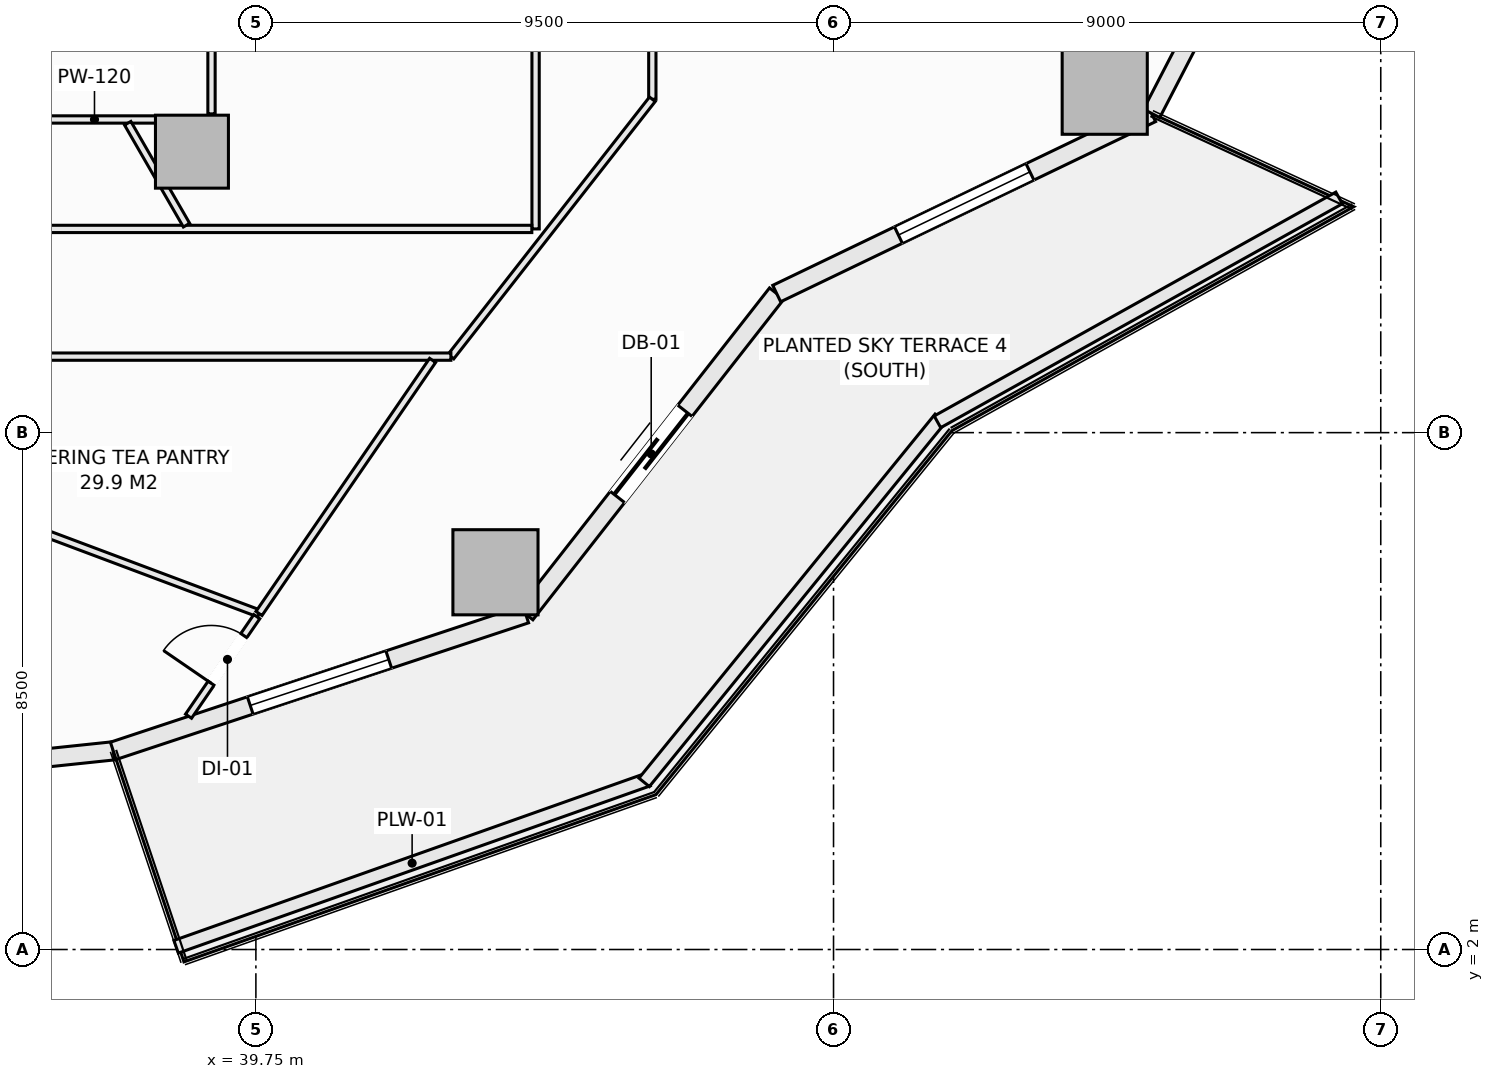
"""IFC4 building model, lengths in metres.
Left out: names, types, materials, properties, quantities, classifications, styles, units other than length and angle.
Written with IfcOpenShell. Run it as: python <this file> out.ifc"""

import sys

from ifc_helpers import new_model, si_unit, direction, frame, frame_2d, origin, origin_2d, place, context, subcontext, project, spatial, rectangle, extrude, element, fill, save


model = new_model("IFC4")
c1 = context("Model", 3, precision=1e-05, world=origin(), true_north=direction((0.0, 1.0)))
c2 = subcontext(c1, "Body", "Model", "MODEL_VIEW")
j1 = project(units=[si_unit("LENGTHUNIT", "METRE"), si_unit("PLANEANGLEUNIT", "RADIAN")], contexts=[c1])
p1 = place(None, origin())
s1 = spatial("IfcSite", under=j1, at=p1, CompositionType="ELEMENT")
p2 = place(p1, origin())
s2 = spatial("IfcBuilding", under=s1, at=p2, CompositionType="ELEMENT")
p3 = place(p2, frame((0.0, 0.0, 34.2)))
s3 = spatial("IfcBuildingStorey", under=s2, at=p3, CompositionType="ELEMENT", Elevation=34.2)
for number, where, z_axis, x_axis in (
    (1, (43.69, 8.204, -0.28), (0.0, 0.0, 1.0), (1.0, 0.0, 0.0)),
    (2, (53.71, 16.106, -0.28), (0.0, 0.0, 1.0), (1.0, 0.0, 0.0)),
):
    element("IfcColumn", number, at=place(p3, frame(where, z_axis=z_axis, x_axis=x_axis)), inside=s3, PredefinedType="COLUMN", context=c2, shape_type="SweptSolid", body=[
        extrude(rectangle(XDim=1.4, YDim=1.4, at=origin_2d()), origin(), (0.0, 0.0, 1.0), 3.85),
    ])
p4 = place(p3, frame((38.698, 15.121, -0.28), z_axis=(0.0, 0.0, 1.0), x_axis=(1.0, 0.0, 0.0)))
e3 = element("IfcColumn", 3, at=p4, inside=s3, PredefinedType="COLUMN", context=c2, shape_type="SweptSolid", body=[
    extrude(rectangle(XDim=1.2, YDim=1.2, at=origin_2d()), origin(), (0.0, 0.0, 1.0), 3.85),
])
p5 = place(p3, frame((30.125, 4.5, 0.0), z_axis=(0.0, 0.0, 1.0), x_axis=(0.994500334317, 0.104733399844, 0.0)))
e4 = element("IfcWall", 4, at=p5, inside=s3, PredefinedType="SOLIDWALL", context=c2, shape_type="SweptSolid", body=[
    extrude(rectangle(XDim=7.32, YDim=0.3, at=frame_2d((3.66, 0.0))), origin(), (0.0, 0.0, 1.0), 3.093),
])
p6 = place(p5, frame((2.46, 0.0, 0.85)))
e5 = element("IfcOpeningElement", 5, at=p6, cuts=e4, PredefinedType="OPENING", context=c2, shape_type="SweptSolid", body=[
    extrude(rectangle(XDim=2.4, YDim=1.9, at=frame_2d((1.2, 0.95))), frame((0.0, 0.16, 0.0), z_axis=(0.0, -1.0, 0.0), x_axis=(1.0, 0.0, 0.0)), (0.0, 0.0, 1.0), 0.32),
])
p7 = place(p3, frame((37.404, 5.267, 0.0), z_axis=(0.0, 0.0, 1.0), x_axis=(0.949238715533, 0.31455661006, 0.0)))
e6 = element("IfcWall", 6, at=p7, inside=s3, PredefinedType="SOLIDWALL", context=c2, shape_type="SweptSolid", body=[
    extrude(rectangle(XDim=7.146, YDim=0.3, at=frame_2d((3.573, 0.0))), origin(), (0.0, 0.0, 1.0), 3.093),
])
p8 = place(p7, frame((2.373, 0.0, 0.85)))
e7 = element("IfcOpeningElement", 7, at=p8, cuts=e6, PredefinedType="OPENING", context=c2, shape_type="SweptSolid", body=[
    extrude(rectangle(XDim=2.4, YDim=1.9, at=frame_2d((1.2, 0.95))), frame((0.0, 0.16, 0.0), z_axis=(0.0, -1.0, 0.0), x_axis=(1.0, 0.0, 0.0)), (0.0, 0.0, 1.0), 0.32),
])
p9 = place(p3, frame((44.188, 7.514, 0.0), z_axis=(0.0, 0.0, 1.0), x_axis=(0.616421309777, 0.787416515482, 0.0)))
e8 = element("IfcWall", 8, at=p9, inside=s3, PredefinedType="SOLIDWALL", context=c2, shape_type="SweptSolid", body=[
    extrude(rectangle(XDim=6.696, YDim=0.3, at=frame_2d((3.348, 0.0))), origin(), (0.0, 0.0, 1.0), 3.093),
])
p10 = place(p9, frame((2.448, 0.0, 0.0)))
e9 = element("IfcOpeningElement", 9, at=p10, cuts=e8, PredefinedType="OPENING", context=c2, shape_type="SweptSolid", body=[
    extrude(rectangle(XDim=1.8, YDim=2.25, at=frame_2d((0.9, 1.125))), frame((0.0, 0.16, 0.0), z_axis=(0.0, -1.0, 0.0), x_axis=(1.0, 0.0, 0.0)), (0.0, 0.0, 1.0), 0.32),
])
p11 = place(p3, frame((48.315, 12.787, 0.0), z_axis=(0.0, 0.0, 1.0), x_axis=(0.901360393999, 0.433069786673, 0.0)))
e10 = element("IfcWall", 10, at=p11, inside=s3, PredefinedType="SOLIDWALL", context=c2, shape_type="SweptSolid", body=[
    extrude(rectangle(XDim=6.842, YDim=0.3, at=frame_2d((3.421, 0.0))), origin(), (0.0, 0.0, 1.0), 3.093),
])
p12 = place(p11, frame((2.221, 0.0, 0.85)))
e11 = element("IfcOpeningElement", 11, at=p12, cuts=e10, PredefinedType="OPENING", context=c2, shape_type="SweptSolid", body=[
    extrude(rectangle(XDim=2.4, YDim=1.9, at=frame_2d((1.2, 0.95))), frame((0.0, 0.16, 0.0), z_axis=(0.0, -1.0, 0.0), x_axis=(1.0, 0.0, 0.0)), (0.0, 0.0, 1.0), 0.32),
])
p13 = place(p3, frame((54.482, 15.75, 0.0), z_axis=(0.0, 0.0, 1.0), x_axis=(0.459809804413, 0.88801742312, 0.0)))
e12 = element("IfcWall", 12, at=p13, inside=s3, PredefinedType="SOLIDWALL", context=c2, shape_type="SweptSolid", body=[
    extrude(rectangle(XDim=6.111, YDim=0.3, at=frame_2d((3.055, 0.0))), origin(), (0.0, 0.0, 1.0), 3.093),
])
p14 = place(p13, frame((1.855, 0.0, 0.85)))
e13 = element("IfcOpeningElement", 13, at=p14, cuts=e12, PredefinedType="OPENING", context=c2, shape_type="SweptSolid", body=[
    extrude(rectangle(XDim=2.4, YDim=1.9, at=frame_2d((1.2, 0.95))), frame((0.0, 0.16, 0.0), z_axis=(0.0, -1.0, 0.0), x_axis=(1.0, 0.0, 0.0)), (0.0, 0.0, 1.0), 0.32),
])
p15 = place(p3, frame((38.438, 2.045, 0.0), z_axis=(0.0, 0.0, 1.0), x_axis=(0.942581348797, 0.333976647237, 0.0)))
e14 = element("IfcWall", 14, at=p15, inside=s3, PredefinedType="PARAPET", context=c2, shape_type="SweptSolid", body=[
    extrude(rectangle(XDim=8.236, YDim=0.22, at=frame_2d((4.118, 0.0))), origin(), (0.0, 0.0, 1.0), 0.52),
])
p16 = place(p3, frame((46.136, 4.749, 0.0), z_axis=(0.0, 0.0, 1.0), x_axis=(0.630997450658, 0.775784903993, 0.0)))
e15 = element("IfcWall", 15, at=p16, inside=s3, PredefinedType="PARAPET", context=c2, shape_type="SweptSolid", body=[
    extrude(rectangle(XDim=7.718, YDim=0.22, at=frame_2d((3.859, 0.0))), origin(), (0.0, 0.0, 1.0), 0.52),
])
p17 = place(p3, frame((50.959, 10.678, 0.0), z_axis=(0.0, 0.0, 1.0), x_axis=(0.873500119739, 0.48682393205, 0.0)))
e16 = element("IfcWall", 16, at=p17, inside=s3, PredefinedType="PARAPET", context=c2, shape_type="SweptSolid", body=[
    extrude(rectangle(XDim=7.562, YDim=0.22, at=frame_2d((3.781, 0.0))), origin(), (0.0, 0.0, 1.0), 0.52),
])
p18 = place(p3, frame((44.35, 13.85, 0.0), z_axis=(0.0, 0.0, 1.0), x_axis=(0.0, 1.0, 0.0)))
e17 = element("IfcWall", 17, at=p18, inside=s3, PredefinedType="PARTITIONING", context=c2, shape_type="SweptSolid", body=[
    extrude(rectangle(XDim=9.17, YDim=0.12, at=frame_2d((4.585, 0.0))), origin(), (0.0, 0.0, 1.0), 3.57),
])
p19 = place(p18, frame((4.11, 0.0, 0.0)))
e18 = element("IfcOpeningElement", 18, at=p19, cuts=e17, PredefinedType="OPENING", context=c2, shape_type="SweptSolid", body=[
    extrude(rectangle(XDim=0.95, YDim=2.1, at=frame_2d((0.475, 1.05))), frame((0.0, 0.07, 0.0), z_axis=(0.0, -1.0, 0.0), x_axis=(1.0, 0.0, 0.0)), (0.0, 0.0, 1.0), 0.14),
])
p20 = place(p3, frame((46.27, 15.982, 0.0), z_axis=(0.0, 0.0, 1.0), x_axis=(0.0, 1.0, 0.0)))
e19 = element("IfcWall", 19, at=p20, inside=s3, PredefinedType="PARTITIONING", context=c2, shape_type="SweptSolid", body=[
    extrude(rectangle(XDim=22.036, YDim=0.12, at=frame_2d((11.018, 0.0))), origin(), (0.0, 0.0, 1.0), 3.57),
])
p21 = place(p20, frame((9.28, 0.0, 0.0)))
e20 = element("IfcOpeningElement", 20, at=p21, cuts=e19, PredefinedType="OPENING", context=c2, shape_type="SweptSolid", body=[
    extrude(rectangle(XDim=0.95, YDim=2.1, at=frame_2d((0.475, 1.05))), frame((0.0, 0.07, 0.0), z_axis=(0.0, -1.0, 0.0), x_axis=(1.0, 0.0, 0.0)), (0.0, 0.0, 1.0), 0.14),
])
p22 = place(p3, frame((42.957, 11.75, 0.0), z_axis=(0.0, 0.0, 1.0), x_axis=(0.616428289415, 0.78741105149, 0.0)))
e21 = element("IfcWall", 21, at=p22, inside=s3, PredefinedType="PARTITIONING", context=c2, shape_type="SweptSolid", body=[
    extrude(rectangle(XDim=5.375, YDim=0.12, at=frame_2d((2.687, 0.0))), origin(), (0.0, 0.0, 1.0), 3.57),
])
p23 = place(p3, frame((23.462, 11.75, 0.0), z_axis=(0.0, 0.0, 1.0), x_axis=(1.0, 0.0, 0.0)))
e22 = element("IfcWall", 22, at=p23, inside=s3, PredefinedType="PARTITIONING", context=c2, shape_type="SweptSolid", body=[
    extrude(rectangle(XDim=19.495, YDim=0.12, at=frame_2d((9.748, 0.0))), origin(), (0.0, 0.0, 1.0), 3.57),
])
p24 = place(p23, frame((3.434, 0.0, 0.0)))
e23 = element("IfcOpeningElement", 23, at=p24, cuts=e22, PredefinedType="OPENING", context=c2, shape_type="SweptSolid", body=[
    extrude(rectangle(XDim=0.95, YDim=2.1, at=frame_2d((0.475, 1.05))), frame((0.0, 0.07, 0.0), z_axis=(0.0, -1.0, 0.0), x_axis=(1.0, 0.0, 0.0)), (0.0, 0.0, 1.0), 0.14),
])
p25 = place(p23, frame((11.388, 0.0, 0.0)))
e24 = element("IfcOpeningElement", 24, at=p25, cuts=e22, PredefinedType="OPENING", context=c2, shape_type="SweptSolid", body=[
    extrude(rectangle(XDim=0.95, YDim=2.1, at=frame_2d((0.475, 1.05))), frame((0.0, 0.07, 0.0), z_axis=(0.0, -1.0, 0.0), x_axis=(1.0, 0.0, 0.0)), (0.0, 0.0, 1.0), 0.14),
])
p26 = place(p3, frame((35.95, 13.85, 0.0), z_axis=(0.0, 0.0, 1.0), x_axis=(1.0, 0.0, 0.0)))
e25 = element("IfcWall", 25, at=p26, inside=s3, PredefinedType="PARTITIONING", context=c2, shape_type="SweptSolid", body=[
    extrude(rectangle(XDim=8.338, YDim=0.12, at=frame_2d((4.169, 0.0))), origin(), (0.0, 0.0, 1.0), 3.57),
])
p27 = place(p3, frame((35.95, 15.65, 0.0), z_axis=(0.0, 0.0, 1.0), x_axis=(1.0, 0.0, 0.0)))
e26 = element("IfcWall", 26, at=p27, inside=s3, PredefinedType="PARTITIONING", context=c2, shape_type="SweptSolid", body=[
    extrude(rectangle(XDim=2.291, YDim=0.12, at=frame_2d((1.146, 0.0))), origin(), (0.0, 0.0, 1.0), 3.57),
])
p28 = place(p3, frame((39.02, 15.742, 0.0), z_axis=(0.0, 0.0, 1.0), x_axis=(0.0, 1.0, 0.0)))
e27 = element("IfcWall", 27, at=p28, inside=s3, PredefinedType="PARTITIONING", context=c2, shape_type="SweptSolid", body=[
    extrude(rectangle(XDim=1.268, YDim=0.12, at=frame_2d((0.634, 0.0))), origin(), (0.0, 0.0, 1.0), 2.934),
])
p29 = place(p3, frame((28.702, 11.688, 0.0), z_axis=(0.0, 0.0, 1.0), x_axis=(0.936344412232, -0.351082813139, 0.0)))
e28 = element("IfcWall", 28, at=p29, inside=s3, PredefinedType="PARTITIONING", context=c2, shape_type="SweptSolid", body=[
    extrude(rectangle(XDim=11.854, YDim=0.12, at=frame_2d((5.927, 0.0))), origin(), (0.0, 0.0, 1.0), 3.093),
])
p30 = place(p3, frame((38.642, 5.837, 0.0), z_axis=(0.0, 0.0, 1.0), x_axis=(0.565776914944, 0.82455835604, 0.0)))
e29 = element("IfcWall", 29, at=p30, inside=s3, PredefinedType="PARTITIONING", context=c2, shape_type="SweptSolid", body=[
    extrude(rectangle(XDim=1.985, YDim=0.12, at=frame_2d((0.992, 0.0))), origin(), (0.0, 0.0, 1.0), 3.57),
])
p31 = place(p30, frame((0.657, 0.0, 0.0)))
e30 = element("IfcOpeningElement", 30, at=p31, cuts=e29, PredefinedType="OPENING", context=c2, shape_type="SweptSolid", body=[
    extrude(rectangle(XDim=0.95, YDim=2.1, at=frame_2d((0.475, 1.05))), frame((0.0, 0.07, 0.0), z_axis=(0.0, -1.0, 0.0), x_axis=(1.0, 0.0, 0.0)), (0.0, 0.0, 1.0), 0.14),
])
p32 = place(p3, frame((39.801, 7.526, 0.0), z_axis=(0.0, 0.0, 1.0), x_axis=(0.565756744253, 0.824572195949, 0.0)))
e31 = element("IfcWall", 31, at=p32, inside=s3, PredefinedType="PARTITIONING", context=c2, shape_type="SweptSolid", body=[
    extrude(rectangle(XDim=5.048, YDim=0.12, at=frame_2d((2.524, 0.0))), origin(), (0.0, 0.0, 1.0), 3.57),
])
p33 = place(p3, frame((37.642, 15.588, 0.0), z_axis=(0.0, 0.0, 1.0), x_axis=(0.499911776505, -0.866076333652, 0.0)))
e32 = element("IfcWall", 32, at=p33, inside=s3, PredefinedType="PARTITIONING", context=c2, shape_type="SweptSolid", body=[
    extrude(rectangle(XDim=1.935, YDim=0.12, at=frame_2d((0.967, 0.0))), origin(), (0.0, 0.0, 1.0), 3.57),
])
p34 = place(p8, origin())
e33 = element("IfcWindow", 33, at=p34, inside=s3, PartitioningType="SINGLE_PANEL", PredefinedType="WINDOW", context=c2, shape_type="SweptSolid", body=[
    extrude(rectangle(XDim=2.4, YDim=1.9, at=frame_2d((1.2, 0.95))), frame((0.0, 0.03, 0.0), z_axis=(0.0, -1.0, 0.0), x_axis=(1.0, 0.0, 0.0)), (0.0, 0.0, 1.0), 0.06),
])
fill(e7, e33)
p35 = place(p10, frame((1.8, 0.0, 0.0), z_axis=(0.0, 0.0, 1.0), x_axis=(-1.0, 0.0, 0.0)))
e34 = element("IfcDoor", 34, at=p35, inside=s3, OperationType="SLIDING_TO_LEFT", PredefinedType="DOOR", context=c2, shape_type="SweptSolid", body=[
    extrude(rectangle(XDim=1.8, YDim=2.25, at=frame_2d((0.9, 1.125))), frame((0.0, 0.025, 0.0), z_axis=(0.0, -1.0, 0.0), x_axis=(1.0, 0.0, 0.0)), (0.0, 0.0, 1.0), 0.05),
])
fill(e9, e34)
p36 = place(p12, origin())
e35 = element("IfcWindow", 35, at=p36, inside=s3, PartitioningType="SINGLE_PANEL", PredefinedType="WINDOW", context=c2, shape_type="SweptSolid", body=[
    extrude(rectangle(XDim=2.4, YDim=1.9, at=frame_2d((1.2, 0.95))), frame((0.0, 0.03, 0.0), z_axis=(0.0, -1.0, 0.0), x_axis=(1.0, 0.0, 0.0)), (0.0, 0.0, 1.0), 0.06),
])
fill(e11, e35)
p37 = place(p31, origin())
e36 = element("IfcDoor", 36, at=p37, inside=s3, OperationType="SINGLE_SWING_LEFT", PredefinedType="DOOR", context=c2, shape_type="SweptSolid", body=[
    extrude(rectangle(XDim=0.95, YDim=2.1, at=frame_2d((0.475, 1.05))), frame((0.0, 0.025, 0.0), z_axis=(0.0, -1.0, 0.0), x_axis=(1.0, 0.0, 0.0)), (0.0, 0.0, 1.0), 0.05),
])
fill(e30, e36)
save(model, sys.argv[1])
